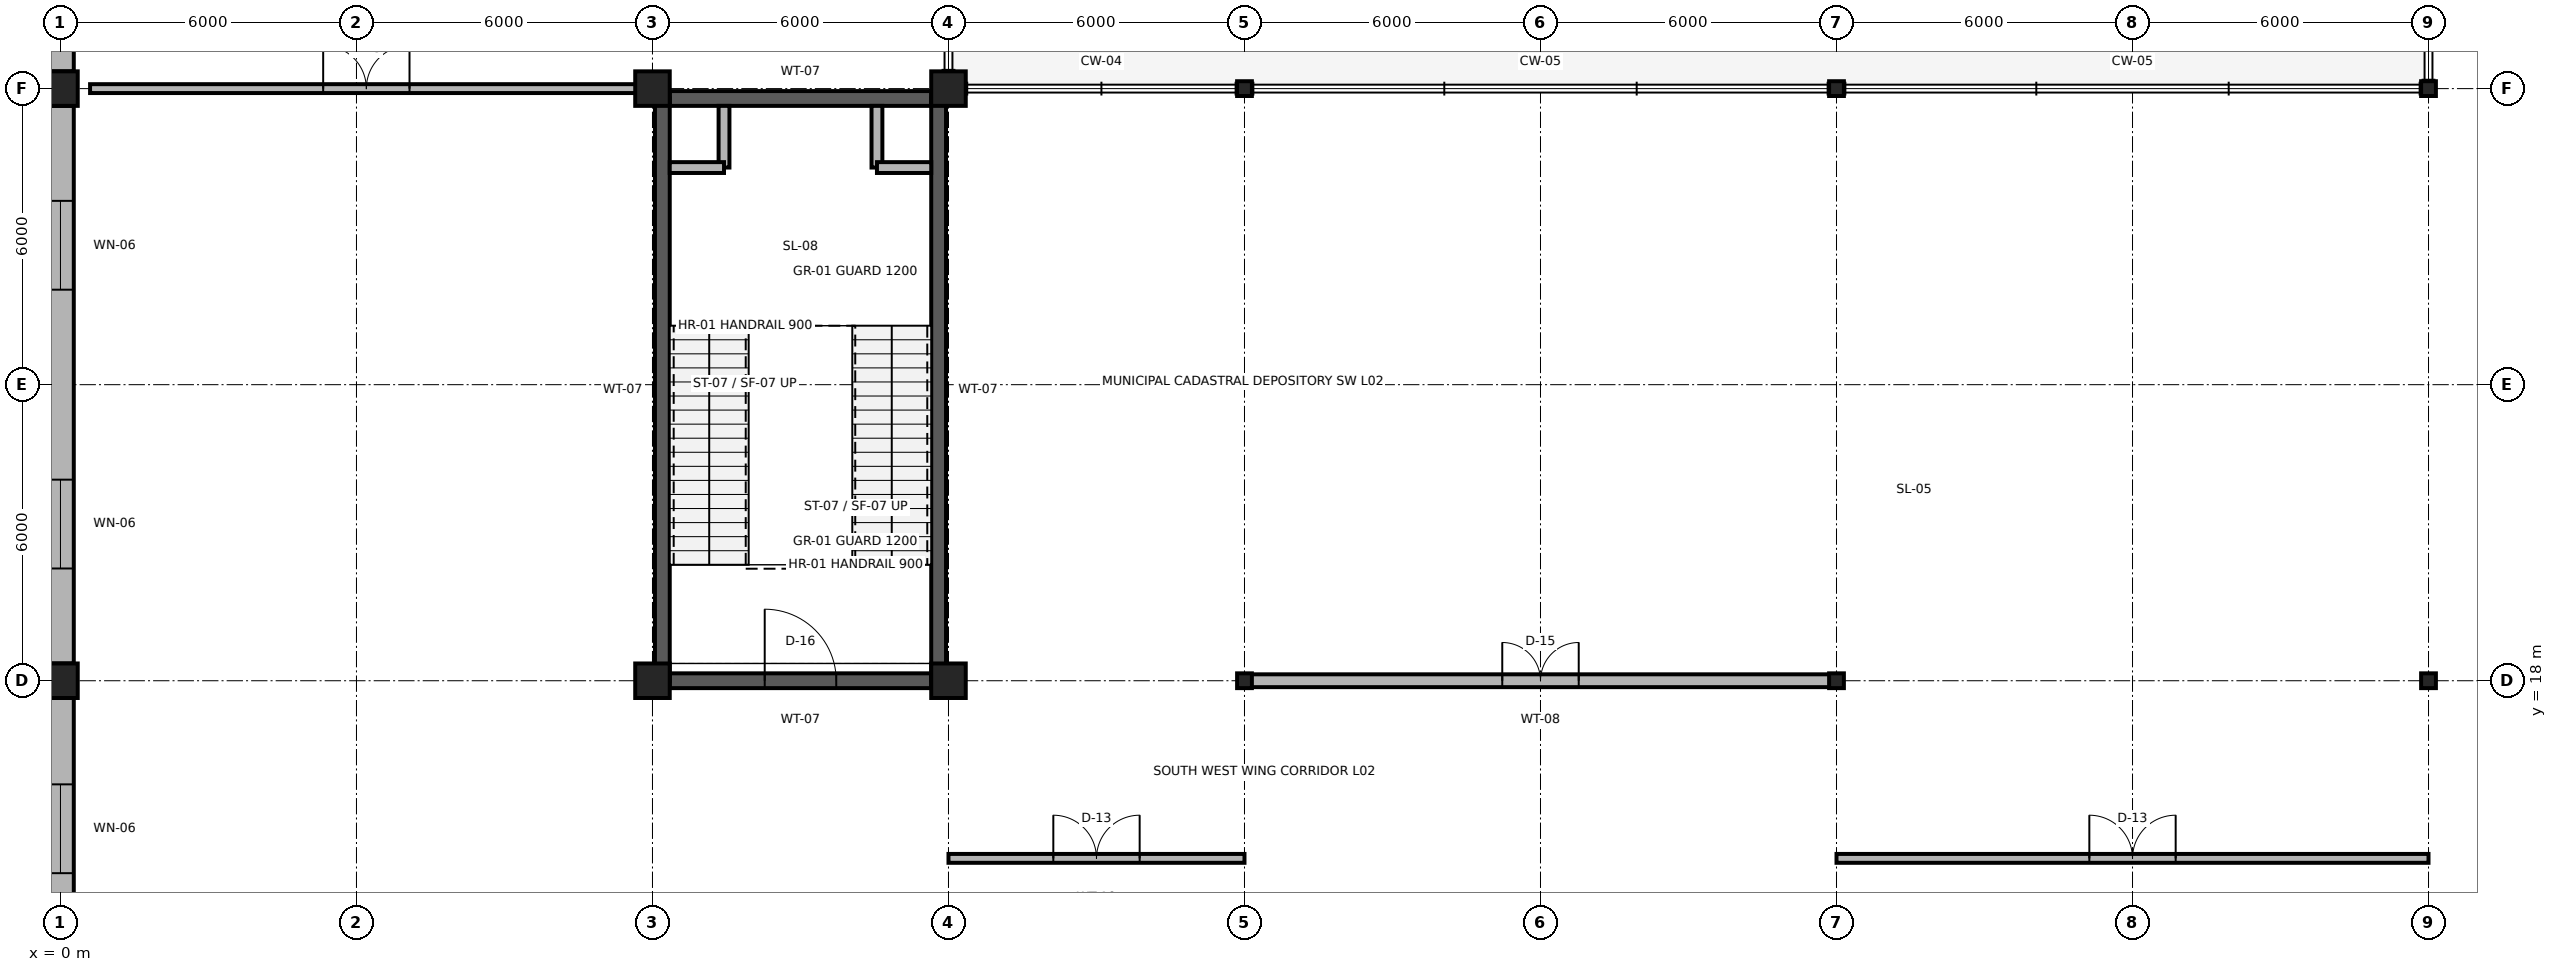
"""IFC4 building model, lengths in metres.
Left out: names, types, materials, properties, quantities, classifications, styles, units other than length and angle.
Written with IfcOpenShell. Run it as: python <this file> out.ifc"""

import sys

from ifc_helpers import new_model, si_unit, direction, frame, frame_2d, origin, origin_2d, place, context, subcontext, project, spatial, rectangle, i_section, extrude, element, fill, save


model = new_model("IFC4")
c1 = context("Model", 3, precision=1e-05, world=origin(), true_north=direction((0.0, 1.0)))
c2 = subcontext(c1, "Body", "Model", "MODEL_VIEW")
j1 = project(units=[si_unit("LENGTHUNIT", "METRE"), si_unit("PLANEANGLEUNIT", "RADIAN")], contexts=[c1])
p1 = place(None, origin())
s1 = spatial("IfcSite", under=j1, at=p1, CompositionType="ELEMENT")
p2 = place(p1, origin())
s2 = spatial("IfcBuilding", under=s1, at=p2, CompositionType="ELEMENT")
p3 = place(p2, frame((0.0, 0.0, 6.0)))
s3 = spatial("IfcBuildingStorey", under=s2, at=p3, CompositionType="ELEMENT", Elevation=6.0)
for number, where, z_axis, x_axis in (
    (1, (0.0, 18.0, 0.0), (0.0, 0.0, 1.0), (1.0, 0.0, 0.0)),
    (2, (12.0, 18.0, 0.0), (0.0, 0.0, 1.0), (1.0, 0.0, 0.0)),
    (3, (18.0, 18.0, 0.0), (0.0, 0.0, 1.0), (1.0, 0.0, 0.0)),
):
    element("IfcColumn", number, at=place(p3, frame(where, z_axis=z_axis, x_axis=x_axis)), inside=s3, PredefinedType="COLUMN", context=c2, shape_type="SweptSolid", body=[
        extrude(rectangle(XDim=0.7, YDim=0.7, at=origin_2d()), origin(), (0.0, 0.0, 1.0), 6.0),
    ])
for number, where, z_axis, x_axis in (
    (4, (24.0, 18.0, 0.0), (0.0, 0.0, 1.0), (1.0, 0.0, 0.0)),
    (5, (36.0, 18.0, 0.0), (0.0, 0.0, 1.0), (1.0, 0.0, 0.0)),
    (6, (48.0, 18.0, 0.0), (0.0, 0.0, 1.0), (1.0, 0.0, 0.0)),
):
    element("IfcColumn", number, at=place(p3, frame(where, z_axis=z_axis, x_axis=x_axis)), inside=s3, PredefinedType="COLUMN", context=c2, shape_type="SweptSolid", body=[
        extrude(i_section(OverallWidth=0.3, OverallDepth=0.3, WebThickness=0.01, FlangeThickness=0.015, FilletRadius=0.018, at=origin_2d()), origin(), (0.0, 0.0, 1.0), 6.0),
    ])
for number, where, z_axis, x_axis in (
    (7, (0.0, 30.0, 0.0), (0.0, 0.0, 1.0), (1.0, 0.0, 0.0)),
    (8, (12.0, 30.0, 0.0), (0.0, 0.0, 1.0), (1.0, 0.0, 0.0)),
    (9, (18.0, 30.0, 0.0), (0.0, 0.0, 1.0), (1.0, 0.0, 0.0)),
):
    element("IfcColumn", number, at=place(p3, frame(where, z_axis=z_axis, x_axis=x_axis)), inside=s3, PredefinedType="COLUMN", context=c2, shape_type="SweptSolid", body=[
        extrude(rectangle(XDim=0.7, YDim=0.7, at=origin_2d()), origin(), (0.0, 0.0, 1.0), 6.0),
    ])
for number, where, z_axis, x_axis in (
    (10, (24.0, 30.0, 0.0), (0.0, 0.0, 1.0), (1.0, 0.0, 0.0)),
    (11, (36.0, 30.0, 0.0), (0.0, 0.0, 1.0), (1.0, 0.0, 0.0)),
    (12, (48.0, 30.0, 0.0), (0.0, 0.0, 1.0), (1.0, 0.0, 0.0)),
):
    element("IfcColumn", number, at=place(p3, frame(where, z_axis=z_axis, x_axis=x_axis)), inside=s3, PredefinedType="COLUMN", context=c2, shape_type="SweptSolid", body=[
        extrude(i_section(OverallWidth=0.3, OverallDepth=0.3, WebThickness=0.01, FlangeThickness=0.015, FilletRadius=0.018, at=origin_2d()), origin(), (0.0, 0.0, 1.0), 6.0),
    ])
p4 = place(p3, frame((0.0, 12.35, 0.0), z_axis=(0.0, 0.0, 1.0), x_axis=(0.0, 1.0, 0.0)))
e13 = element("IfcWall", 13, at=p4, inside=s3, PredefinedType="SOLIDWALL", context=c2, shape_type="SweptSolid", body=[
    extrude(rectangle(XDim=5.3, YDim=0.54, at=frame_2d((2.65, 0.0))), origin(), (0.0, 0.0, 1.0), 5.31),
])
p5 = place(p4, frame((1.75, 0.0, 0.85)))
e14 = element("IfcOpeningElement", 14, at=p5, cuts=e13, PredefinedType="OPENING", context=c2, shape_type="SweptSolid", body=[
    extrude(rectangle(XDim=1.8, YDim=3.3, at=frame_2d((0.9, 1.65))), frame((0.0, 0.285, 0.0), z_axis=(0.0, -1.0, 0.0), x_axis=(1.0, 0.0, 0.0)), (0.0, 0.0, 1.0), 0.57),
])
p6 = place(p3, frame((0.0, 18.35, 0.0), z_axis=(0.0, 0.0, 1.0), x_axis=(0.0, 1.0, 0.0)))
e15 = element("IfcWall", 15, at=p6, inside=s3, PredefinedType="SOLIDWALL", context=c2, shape_type="SweptSolid", body=[
    extrude(rectangle(XDim=11.3, YDim=0.54, at=frame_2d((5.65, 0.0))), origin(), (0.0, 0.0, 1.0), 5.31),
])
p7 = place(p6, frame((1.925, 0.0, 0.85)))
e16 = element("IfcOpeningElement", 16, at=p7, cuts=e15, PredefinedType="OPENING", context=c2, shape_type="SweptSolid", body=[
    extrude(rectangle(XDim=1.8, YDim=3.3, at=frame_2d((0.9, 1.65))), frame((0.0, 0.285, 0.0), z_axis=(0.0, -1.0, 0.0), x_axis=(1.0, 0.0, 0.0)), (0.0, 0.0, 1.0), 0.57),
])
p8 = place(p6, frame((7.575, 0.0, 0.85)))
e17 = element("IfcOpeningElement", 17, at=p8, cuts=e15, PredefinedType="OPENING", context=c2, shape_type="SweptSolid", body=[
    extrude(rectangle(XDim=1.8, YDim=3.3, at=frame_2d((0.9, 1.65))), frame((0.0, 0.285, 0.0), z_axis=(0.0, -1.0, 0.0), x_axis=(1.0, 0.0, 0.0)), (0.0, 0.0, 1.0), 0.57),
])
p9 = place(p3, frame((0.0, 30.35, 0.0), z_axis=(0.0, 0.0, 1.0), x_axis=(0.0, 1.0, 0.0)))
e18 = element("IfcWall", 18, at=p9, inside=s3, PredefinedType="SOLIDWALL", context=c2, shape_type="SweptSolid", body=[
    extrude(rectangle(XDim=5.3, YDim=0.54, at=frame_2d((2.65, 0.0))), origin(), (0.0, 0.0, 1.0), 5.31),
])
p10 = place(p9, frame((1.75, 0.0, 0.85)))
e19 = element("IfcOpeningElement", 19, at=p10, cuts=e18, PredefinedType="OPENING", context=c2, shape_type="SweptSolid", body=[
    extrude(rectangle(XDim=1.8, YDim=3.3, at=frame_2d((0.9, 1.65))), frame((0.0, 0.285, 0.0), z_axis=(0.0, -1.0, 0.0), x_axis=(1.0, 0.0, 0.0)), (0.0, 0.0, 1.0), 0.57),
])
p11 = place(p3, frame((12.35, 18.0, 0.0), z_axis=(0.0, 0.0, 1.0), x_axis=(1.0, 0.0, 0.0)))
e20 = element("IfcWall", 20, at=p11, inside=s3, PredefinedType="SHEAR", context=c2, shape_type="SweptSolid", body=[
    extrude(rectangle(XDim=5.3, YDim=0.3, at=frame_2d((2.65, 0.0))), origin(), (0.0, 0.0, 1.0), 5.76),
])
p12 = place(p11, frame((1.925, 0.0, 0.0)))
e21 = element("IfcOpeningElement", 21, at=p12, cuts=e20, PredefinedType="OPENING", context=c2, shape_type="SweptSolid", body=[
    extrude(rectangle(XDim=1.45, YDim=2.25, at=frame_2d((0.725, 1.125))), frame((0.0, 0.165, 0.0), z_axis=(0.0, -1.0, 0.0), x_axis=(1.0, 0.0, 0.0)), (0.0, 0.0, 1.0), 0.33),
])
p13 = place(p3, frame((12.35, 29.8, 0.0), z_axis=(0.0, 0.0, 1.0), x_axis=(1.0, 0.0, 0.0)))
e22 = element("IfcWall", 22, at=p13, inside=s3, PredefinedType="SHEAR", context=c2, shape_type="SweptSolid", body=[
    extrude(rectangle(XDim=5.3, YDim=0.3, at=frame_2d((2.65, 0.0))), origin(), (0.0, 0.0, 1.0), 5.76),
])
for number, where, z_axis, x_axis in (
    (23, (12.2, 18.0, 0.0), (0.0, 0.0, 1.0), (0.0, 1.0, 0.0)),
    (24, (17.8, 18.0, 0.0), (0.0, 0.0, 1.0), (0.0, 1.0, 0.0)),
):
    element("IfcWall", number, at=place(p3, frame(where, z_axis=z_axis, x_axis=x_axis)), inside=s3, PredefinedType="SHEAR", context=c2, shape_type="SweptSolid", body=[
        extrude(rectangle(XDim=11.8, YDim=0.3, at=frame_2d((5.9, 0.0))), origin(), (0.0, 0.0, 1.0), 5.76),
    ])
p14 = place(p3, frame((13.45, 28.4, 0.0), z_axis=(0.0, 0.0, 1.0), x_axis=(0.0, 1.0, 0.0)))
e25 = element("IfcWall", 25, at=p14, inside=s3, PredefinedType="PARTITIONING", context=c2, shape_type="SweptSolid", body=[
    extrude(rectangle(XDim=1.25, YDim=0.22, at=frame_2d((0.625, 0.0))), origin(), (0.0, 0.0, 1.0), 5.76),
])
p15 = place(p3, frame((12.35, 28.4, 0.0), z_axis=(0.0, 0.0, 1.0), x_axis=(1.0, 0.0, 0.0)))
e26 = element("IfcWall", 26, at=p15, inside=s3, PredefinedType="PARTITIONING", context=c2, shape_type="SweptSolid", body=[
    extrude(rectangle(XDim=1.1, YDim=0.22, at=frame_2d((0.55, 0.0))), origin(), (0.0, 0.0, 1.0), 5.76),
])
p16 = place(p3, frame((16.55, 28.4, 0.0), z_axis=(0.0, 0.0, 1.0), x_axis=(0.0, 1.0, 0.0)))
e27 = element("IfcWall", 27, at=p16, inside=s3, PredefinedType="PARTITIONING", context=c2, shape_type="SweptSolid", body=[
    extrude(rectangle(XDim=1.25, YDim=0.22, at=frame_2d((0.625, 0.0))), origin(), (0.0, 0.0, 1.0), 5.76),
])
p17 = place(p3, frame((16.55, 28.4, 0.0), z_axis=(0.0, 0.0, 1.0), x_axis=(1.0, 0.0, 0.0)))
e28 = element("IfcWall", 28, at=p17, inside=s3, PredefinedType="PARTITIONING", context=c2, shape_type="SweptSolid", body=[
    extrude(rectangle(XDim=1.1, YDim=0.22, at=frame_2d((0.55, 0.0))), origin(), (0.0, 0.0, 1.0), 5.76),
])
p18 = place(p3, frame((18.0, 14.4, 0.0), z_axis=(0.0, 0.0, 1.0), x_axis=(1.0, 0.0, 0.0)))
e29 = element("IfcWall", 29, at=p18, inside=s3, PredefinedType="PARTITIONING", context=c2, shape_type="SweptSolid", body=[
    extrude(rectangle(XDim=6.0, YDim=0.18, at=frame_2d((3.0, 0.0))), origin(), (0.0, 0.0, 1.0), 5.76),
])
p19 = place(p18, frame((2.125, 0.0, 0.0)))
e30 = element("IfcOpeningElement", 30, at=p19, cuts=e29, PredefinedType="OPENING", context=c2, shape_type="SweptSolid", body=[
    extrude(rectangle(XDim=1.75, YDim=2.55, at=frame_2d((0.875, 1.275))), frame((0.0, 0.105, 0.0), z_axis=(0.0, -1.0, 0.0), x_axis=(1.0, 0.0, 0.0)), (0.0, 0.0, 1.0), 0.21),
])
p20 = place(p3, frame((36.0, 14.4, 0.0), z_axis=(0.0, 0.0, 1.0), x_axis=(1.0, 0.0, 0.0)))
e31 = element("IfcWall", 31, at=p20, inside=s3, PredefinedType="PARTITIONING", context=c2, shape_type="SweptSolid", body=[
    extrude(rectangle(XDim=12.0, YDim=0.18, at=frame_2d((6.0, 0.0))), origin(), (0.0, 0.0, 1.0), 5.76),
])
p21 = place(p20, frame((5.125, 0.0, 0.0)))
e32 = element("IfcOpeningElement", 32, at=p21, cuts=e31, PredefinedType="OPENING", context=c2, shape_type="SweptSolid", body=[
    extrude(rectangle(XDim=1.75, YDim=2.55, at=frame_2d((0.875, 1.275))), frame((0.0, 0.105, 0.0), z_axis=(0.0, -1.0, 0.0), x_axis=(1.0, 0.0, 0.0)), (0.0, 0.0, 1.0), 0.21),
])
p22 = place(p3, frame((0.6, 30.0, 0.0), z_axis=(0.0, 0.0, 1.0), x_axis=(1.0, 0.0, 0.0)))
e33 = element("IfcWall", 33, at=p22, inside=s3, PredefinedType="PARTITIONING", context=c2, shape_type="SweptSolid", body=[
    extrude(rectangle(XDim=11.2, YDim=0.18, at=frame_2d((5.6, 0.0))), origin(), (0.0, 0.0, 1.0), 5.178),
])
p23 = place(p22, frame((4.725, 0.0, 0.0)))
e34 = element("IfcOpeningElement", 34, at=p23, cuts=e33, PredefinedType="OPENING", context=c2, shape_type="SweptSolid", body=[
    extrude(rectangle(XDim=1.75, YDim=2.55, at=frame_2d((0.875, 1.275))), frame((0.0, 0.105, 0.0), z_axis=(0.0, -1.0, 0.0), x_axis=(1.0, 0.0, 0.0)), (0.0, 0.0, 1.0), 0.21),
])
p24 = place(p3, frame((24.0, 18.0, 0.0), z_axis=(0.0, 0.0, 1.0), x_axis=(1.0, 0.0, 0.0)))
e35 = element("IfcWall", 35, at=p24, inside=s3, PredefinedType="PARTITIONING", context=c2, shape_type="SweptSolid", body=[
    extrude(rectangle(XDim=12.0, YDim=0.26, at=frame_2d((6.0, 0.0))), origin(), (0.0, 0.0, 1.0), 5.178),
])
p25 = place(p24, frame((5.225, 0.0, 0.0)))
e36 = element("IfcOpeningElement", 36, at=p25, cuts=e35, PredefinedType="OPENING", context=c2, shape_type="SweptSolid", body=[
    extrude(rectangle(XDim=1.55, YDim=2.3, at=frame_2d((0.775, 1.15))), frame((0.0, 0.145, 0.0), z_axis=(0.0, -1.0, 0.0), x_axis=(1.0, 0.0, 0.0)), (0.0, 0.0, 1.0), 0.29),
])
p26 = place(p5, origin())
e37 = element("IfcWindow", 37, at=p26, inside=s3, PartitioningType="SINGLE_PANEL", PredefinedType="WINDOW", context=c2, shape_type="SweptSolid", body=[
    extrude(rectangle(XDim=1.8, YDim=3.3, at=frame_2d((0.9, 1.65))), frame((0.0, 0.03, 0.0), z_axis=(0.0, -1.0, 0.0), x_axis=(1.0, 0.0, 0.0)), (0.0, 0.0, 1.0), 0.06),
])
fill(e14, e37)
p27 = place(p7, origin())
e38 = element("IfcWindow", 38, at=p27, inside=s3, PartitioningType="SINGLE_PANEL", PredefinedType="WINDOW", context=c2, shape_type="SweptSolid", body=[
    extrude(rectangle(XDim=1.8, YDim=3.3, at=frame_2d((0.9, 1.65))), frame((0.0, 0.03, 0.0), z_axis=(0.0, -1.0, 0.0), x_axis=(1.0, 0.0, 0.0)), (0.0, 0.0, 1.0), 0.06),
])
fill(e16, e38)
p28 = place(p8, origin())
e39 = element("IfcWindow", 39, at=p28, inside=s3, PartitioningType="SINGLE_PANEL", PredefinedType="WINDOW", context=c2, shape_type="SweptSolid", body=[
    extrude(rectangle(XDim=1.8, YDim=3.3, at=frame_2d((0.9, 1.65))), frame((0.0, 0.03, 0.0), z_axis=(0.0, -1.0, 0.0), x_axis=(1.0, 0.0, 0.0)), (0.0, 0.0, 1.0), 0.06),
])
fill(e17, e39)
p29 = place(p12, origin())
e40 = element("IfcDoor", 40, at=p29, inside=s3, OperationType="SINGLE_SWING_LEFT", PredefinedType="DOOR", context=c2, shape_type="SweptSolid", body=[
    extrude(rectangle(XDim=1.45, YDim=2.25, at=frame_2d((0.725, 1.125))), frame((0.0, 0.025, 0.0), z_axis=(0.0, -1.0, 0.0), x_axis=(1.0, 0.0, 0.0)), (0.0, 0.0, 1.0), 0.05),
])
fill(e21, e40)
p30 = place(p19, origin())
e41 = element("IfcDoor", 41, at=p30, inside=s3, OperationType="DOUBLE_DOOR_SINGLE_SWING", PredefinedType="DOOR", context=c2, shape_type="SweptSolid", body=[
    extrude(rectangle(XDim=1.75, YDim=2.55, at=frame_2d((0.875, 1.275))), frame((0.0, 0.025, 0.0), z_axis=(0.0, -1.0, 0.0), x_axis=(1.0, 0.0, 0.0)), (0.0, 0.0, 1.0), 0.05),
])
fill(e30, e41)
p31 = place(p21, origin())
e42 = element("IfcDoor", 42, at=p31, inside=s3, OperationType="DOUBLE_DOOR_SINGLE_SWING", PredefinedType="DOOR", context=c2, shape_type="SweptSolid", body=[
    extrude(rectangle(XDim=1.75, YDim=2.55, at=frame_2d((0.875, 1.275))), frame((0.0, 0.025, 0.0), z_axis=(0.0, -1.0, 0.0), x_axis=(1.0, 0.0, 0.0)), (0.0, 0.0, 1.0), 0.05),
])
fill(e32, e42)
p32 = place(p23, origin())
e43 = element("IfcDoor", 43, at=p32, inside=s3, OperationType="DOUBLE_DOOR_SINGLE_SWING", PredefinedType="DOOR", context=c2, shape_type="SweptSolid", body=[
    extrude(rectangle(XDim=1.75, YDim=2.55, at=frame_2d((0.875, 1.275))), frame((0.0, 0.025, 0.0), z_axis=(0.0, -1.0, 0.0), x_axis=(1.0, 0.0, 0.0)), (0.0, 0.0, 1.0), 0.05),
])
fill(e34, e43)
p33 = place(p25, origin())
e44 = element("IfcDoor", 44, at=p33, inside=s3, OperationType="DOUBLE_DOOR_SINGLE_SWING", PredefinedType="DOOR", context=c2, shape_type="SweptSolid", body=[
    extrude(rectangle(XDim=1.55, YDim=2.3, at=frame_2d((0.775, 1.15))), frame((0.0, 0.025, 0.0), z_axis=(0.0, -1.0, 0.0), x_axis=(1.0, 0.0, 0.0)), (0.0, 0.0, 1.0), 0.05),
])
fill(e36, e44)
save(model, sys.argv[1])
